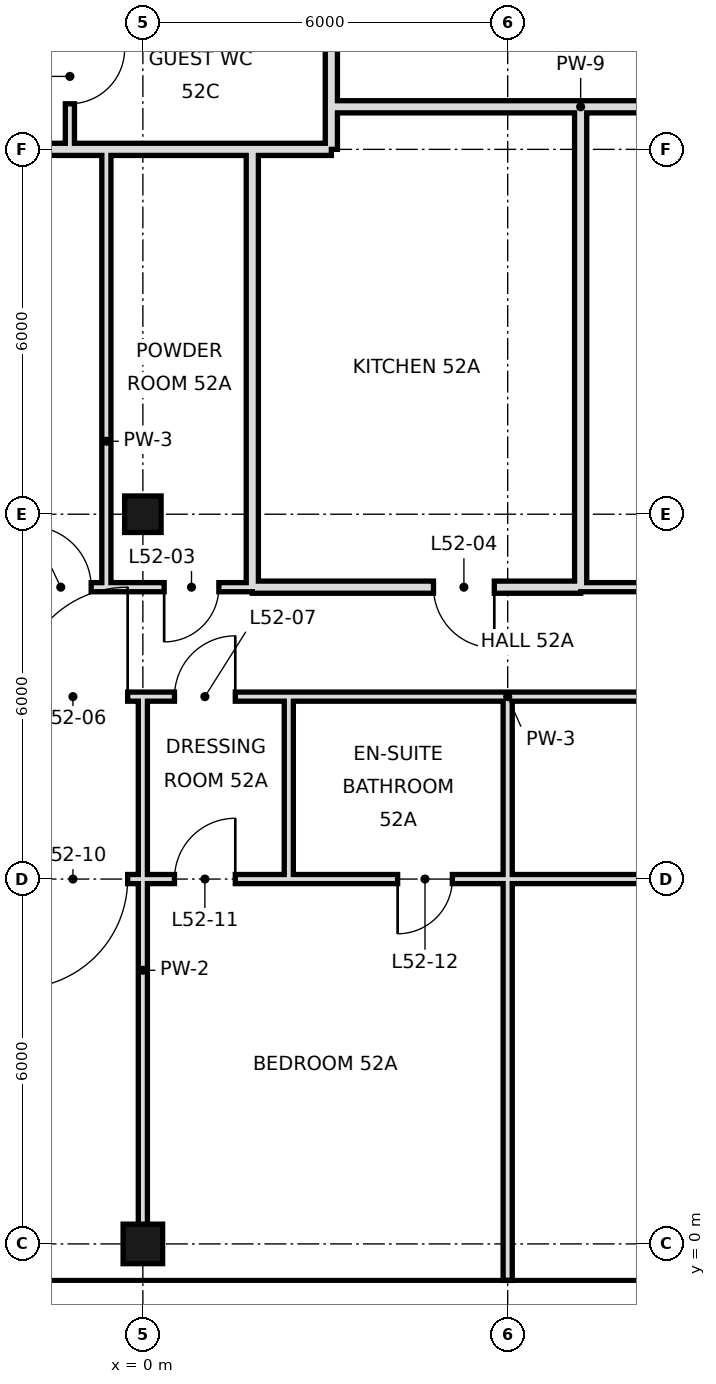
"""IFC4 building model, lengths in metres.
Left out: names, types, materials, properties, quantities, classifications, styles, units other than length and angle.
Written with IfcOpenShell. Run it as: python <this file> out.ifc"""

import sys

from ifc_helpers import new_model, si_unit, direction, frame, frame_2d, origin, origin_with_axes, origin_2d, place, context, subcontext, project, spatial, rectangle, hollow_rectangle, extrude, element, fill, save


model = new_model("IFC4")
c1 = context("Model", 3, precision=1e-05, world=origin(), true_north=direction((0.0, 1.0)))
c2 = subcontext(c1, "Body", "Model", "MODEL_VIEW")
j1 = project(units=[si_unit("LENGTHUNIT", "METRE"), si_unit("PLANEANGLEUNIT", "RADIAN")], contexts=[c1])
p1 = place(None, origin())
s1 = spatial("IfcSite", under=j1, at=p1, CompositionType="ELEMENT")
p2 = place(p1, origin())
s2 = spatial("IfcBuilding", under=s1, at=p2, CompositionType="ELEMENT")
p3 = place(p2, frame((0.0, 0.0, 222.6)))
s3 = spatial("IfcBuildingStorey", under=s2, at=p3, CompositionType="ELEMENT", Elevation=222.6)
p4 = place(p3, origin_with_axes())
e1 = element("IfcColumn", 1, at=p4, inside=s3, PredefinedType="COLUMN", context=c2, shape_type="SweptSolid", body=[
    extrude(hollow_rectangle(XDim=0.65, YDim=0.65, WallThickness=0.032, at=origin_2d()), origin(), (0.0, 0.0, 1.0), 3.6),
])
p5 = place(p3, frame((0.0, 12.0, 0.0), z_axis=(0.0, 0.0, 1.0), x_axis=(1.0, 0.0, 0.0)))
e2 = element("IfcColumn", 2, at=p5, inside=s3, PredefinedType="COLUMN", context=c2, shape_type="SweptSolid", body=[
    extrude(hollow_rectangle(XDim=0.6, YDim=0.6, WallThickness=0.028, at=origin_2d()), origin(), (0.0, 0.0, 1.0), 3.6),
])
p6 = place(p3, frame((-0.6, 10.8, 0.0), z_axis=(0.0, 0.0, 1.0), x_axis=(0.0, 1.0, 0.0)))
e3 = element("IfcWall", 3, at=p6, inside=s3, PredefinedType="PARTITIONING", context=c2, shape_type="SweptSolid", body=[
    extrude(rectangle(XDim=7.2, YDim=0.15, at=frame_2d((3.6, 0.0))), origin(), (0.0, 0.0, 1.0), 3.42),
])
p7 = place(p3, frame((-1.2, 18.0, 0.0), z_axis=(0.0, 0.0, 1.0), x_axis=(0.0, 1.0, 0.0)))
e4 = element("IfcWall", 4, at=p7, inside=s3, PredefinedType="PARTITIONING", context=c2, shape_type="SweptSolid", body=[
    extrude(rectangle(XDim=2.4, YDim=0.15, at=frame_2d((1.2, 0.0))), origin(), (0.0, 0.0, 1.0), 3.42),
])
p8 = place(p7, frame((0.75, 0.0, 0.0)))
e5 = element("IfcOpeningElement", 5, at=p8, cuts=e4, PredefinedType="OPENING", context=c2, shape_type="SweptSolid", body=[
    extrude(rectangle(XDim=0.9, YDim=2.4, at=frame_2d((0.45, 1.2))), frame((0.0, 0.085, 0.0), z_axis=(0.0, -1.0, 0.0), x_axis=(1.0, 0.0, 0.0)), (0.0, 0.0, 1.0), 0.17),
])
p9 = place(p3, frame((0.0, 0.0, 0.0), z_axis=(0.0, 0.0, 1.0), x_axis=(0.0, 1.0, 0.0)))
e6 = element("IfcWall", 6, at=p9, inside=s3, PredefinedType="PARTITIONING", context=c2, shape_type="SweptSolid", body=[
    extrude(rectangle(XDim=9.0, YDim=0.15, at=frame_2d((4.5, 0.0))), origin(), (0.0, 0.0, 1.0), 2.72),
])
p10 = place(p3, frame((1.8, 10.8, 0.0), z_axis=(0.0, 0.0, 1.0), x_axis=(0.0, 1.0, 0.0)))
e7 = element("IfcWall", 7, at=p10, inside=s3, PredefinedType="SOLIDWALL", context=c2, shape_type="SweptSolid", body=[
    extrude(rectangle(XDim=7.2, YDim=0.2, at=frame_2d((3.6, 0.0))), origin(), (0.0, 0.0, 1.0), 3.42),
])
p11 = place(p3, frame((2.4, 6.0, 0.0), z_axis=(0.0, 0.0, 1.0), x_axis=(0.0, 1.0, 0.0)))
e8 = element("IfcWall", 8, at=p11, inside=s3, PredefinedType="PARTITIONING", context=c2, shape_type="SweptSolid", body=[
    extrude(rectangle(XDim=3.0, YDim=0.15, at=frame_2d((1.5, 0.0))), origin(), (0.0, 0.0, 1.0), 3.42),
])
p12 = place(p3, frame((3.1, 18.7, 0.0), z_axis=(0.0, 0.0, 1.0), x_axis=(0.0, 1.0, 0.0)))
e9 = element("IfcWall", 9, at=p12, inside=s3, PredefinedType="SOLIDWALL", context=c2, shape_type="SweptSolid", body=[
    extrude(rectangle(XDim=15.5, YDim=0.2, at=frame_2d((7.75, 0.0))), origin(), (0.0, 0.0, 1.0), 2.97),
])
p13 = place(p12, frame((4.96, 0.0, 0.0)))
e10 = element("IfcOpeningElement", 10, at=p13, cuts=e9, PredefinedType="OPENING", context=c2, shape_type="SweptSolid", body=[
    extrude(rectangle(XDim=1.2, YDim=2.4, at=frame_2d((0.6, 1.2))), frame((0.0, 0.11, 0.0), z_axis=(0.0, -1.0, 0.0), x_axis=(1.0, 0.0, 0.0)), (0.0, 0.0, 1.0), 0.22),
])
p14 = place(p3, frame((3.1, 18.0, 0.0), z_axis=(0.0, 0.0, 1.0), x_axis=(0.0, 1.0, 0.0)))
e11 = element("IfcWall", 11, at=p14, inside=s3, PredefinedType="SOLIDWALL", context=c2, shape_type="SweptSolid", body=[
    extrude(rectangle(XDim=0.7, YDim=0.2, at=frame_2d((0.35, 0.0))), origin(), (0.0, 0.0, 1.0), 2.97),
])
p15 = place(p3, frame((6.0, -0.6, 0.0), z_axis=(0.0, 0.0, 1.0), x_axis=(0.0, 1.0, 0.0)))
e12 = element("IfcWall", 12, at=p15, inside=s3, PredefinedType="PARTITIONING", context=c2, shape_type="SweptSolid", body=[
    extrude(rectangle(XDim=6.6, YDim=0.15, at=frame_2d((3.3, 0.0))), origin(), (0.0, 0.0, 1.0), 2.72),
])
p16 = place(p3, frame((6.0, 6.0, 0.0), z_axis=(0.0, 0.0, 1.0), x_axis=(0.0, 1.0, 0.0)))
e13 = element("IfcWall", 13, at=p16, inside=s3, PredefinedType="PARTITIONING", context=c2, shape_type="SweptSolid", body=[
    extrude(rectangle(XDim=3.0, YDim=0.15, at=frame_2d((1.5, 0.0))), origin(), (0.0, 0.0, 1.0), 2.72),
])
p17 = place(p3, frame((7.2, 10.8, 0.0), z_axis=(0.0, 0.0, 1.0), x_axis=(0.0, 1.0, 0.0)))
e14 = element("IfcWall", 14, at=p17, inside=s3, PredefinedType="SOLIDWALL", context=c2, shape_type="SweptSolid", body=[
    extrude(rectangle(XDim=7.9, YDim=0.2, at=frame_2d((3.95, 0.0))), origin(), (0.0, 0.0, 1.0), 2.72),
])
p18 = place(p3, frame((1.8, 10.8, 0.0), z_axis=(0.0, 0.0, 1.0), x_axis=(1.0, 0.0, 0.0)))
e15 = element("IfcWall", 15, at=p18, inside=s3, PredefinedType="SOLIDWALL", context=c2, shape_type="SweptSolid", body=[
    extrude(rectangle(XDim=5.4, YDim=0.2, at=frame_2d((2.7, 0.0))), origin(), (0.0, 0.0, 1.0), 2.72),
])
p19 = place(p18, frame((2.98, 0.0, 0.0)))
e16 = element("IfcOpeningElement", 16, at=p19, cuts=e15, PredefinedType="OPENING", context=c2, shape_type="SweptSolid", body=[
    extrude(rectangle(XDim=1.0, YDim=2.4, at=frame_2d((0.5, 1.2))), frame((0.0, 0.11, 0.0), z_axis=(0.0, -1.0, 0.0), x_axis=(1.0, 0.0, 0.0)), (0.0, 0.0, 1.0), 0.22),
])
p20 = place(p3, frame((-12.6, 10.8, 0.0), z_axis=(0.0, 0.0, 1.0), x_axis=(1.0, 0.0, 0.0)))
e17 = element("IfcWall", 17, at=p20, inside=s3, PredefinedType="PARTITIONING", context=c2, shape_type="SweptSolid", body=[
    extrude(rectangle(XDim=12.0, YDim=0.15, at=frame_2d((6.0, 0.0))), origin(), (0.0, 0.0, 1.0), 3.42),
])
p21 = place(p20, frame((10.75, 0.0, 0.0)))
e18 = element("IfcOpeningElement", 18, at=p21, cuts=e17, PredefinedType="OPENING", context=c2, shape_type="SweptSolid", body=[
    extrude(rectangle(XDim=1.0, YDim=2.4, at=frame_2d((0.5, 1.2))), frame((0.0, 0.085, 0.0), z_axis=(0.0, -1.0, 0.0), x_axis=(1.0, 0.0, 0.0)), (0.0, 0.0, 1.0), 0.17),
])
p22 = place(p3, frame((7.2, 10.8, 0.0), z_axis=(0.0, 0.0, 1.0), x_axis=(1.0, 0.0, 0.0)))
e19 = element("IfcWall", 19, at=p22, inside=s3, PredefinedType="PARTITIONING", context=c2, shape_type="SweptSolid", body=[
    extrude(rectangle(XDim=24.6, YDim=0.15, at=frame_2d((12.3, 0.0))), origin(), (0.0, 0.0, 1.0), 3.42),
])
p23 = place(p22, frame((1.6, 0.0, 0.0)))
e20 = element("IfcOpeningElement", 20, at=p23, cuts=e19, PredefinedType="OPENING", context=c2, shape_type="SweptSolid", body=[
    extrude(rectangle(XDim=1.0, YDim=2.4, at=frame_2d((0.5, 1.2))), frame((0.0, 0.085, 0.0), z_axis=(0.0, -1.0, 0.0), x_axis=(1.0, 0.0, 0.0)), (0.0, 0.0, 1.0), 0.17),
])
p24 = place(p22, frame((9.04, 0.0, 0.0)))
e21 = element("IfcOpeningElement", 21, at=p24, cuts=e19, PredefinedType="OPENING", context=c2, shape_type="SweptSolid", body=[
    extrude(rectangle(XDim=1.0, YDim=2.4, at=frame_2d((0.5, 1.2))), frame((0.0, 0.085, 0.0), z_axis=(0.0, -1.0, 0.0), x_axis=(1.0, 0.0, 0.0)), (0.0, 0.0, 1.0), 0.17),
])
p25 = place(p22, frame((21.46, 0.0, 0.0)))
e22 = element("IfcOpeningElement", 22, at=p25, cuts=e19, PredefinedType="OPENING", context=c2, shape_type="SweptSolid", body=[
    extrude(rectangle(XDim=1.0, YDim=2.4, at=frame_2d((0.5, 1.2))), frame((0.0, 0.085, 0.0), z_axis=(0.0, -1.0, 0.0), x_axis=(1.0, 0.0, 0.0)), (0.0, 0.0, 1.0), 0.17),
])
p26 = place(p3, frame((-0.6, 10.8, 0.0), z_axis=(0.0, 0.0, 1.0), x_axis=(1.0, 0.0, 0.0)))
e23 = element("IfcWall", 23, at=p26, inside=s3, PredefinedType="PARTITIONING", context=c2, shape_type="SweptSolid", body=[
    extrude(rectangle(XDim=2.4, YDim=0.15, at=frame_2d((1.2, 0.0))), origin(), (0.0, 0.0, 1.0), 3.42),
])
p27 = place(p26, frame((0.95, 0.0, 0.0)))
e24 = element("IfcOpeningElement", 24, at=p27, cuts=e23, PredefinedType="OPENING", context=c2, shape_type="SweptSolid", body=[
    extrude(rectangle(XDim=0.9, YDim=2.4, at=frame_2d((0.45, 1.2))), frame((0.0, 0.085, 0.0), z_axis=(0.0, -1.0, 0.0), x_axis=(1.0, 0.0, 0.0)), (0.0, 0.0, 1.0), 0.17),
])
p28 = place(p3, frame((1.8, 18.0, 0.0), z_axis=(0.0, 0.0, 1.0), x_axis=(1.0, 0.0, 0.0)))
e25 = element("IfcWall", 25, at=p28, inside=s3, PredefinedType="SOLIDWALL", context=c2, shape_type="SweptSolid", body=[
    extrude(rectangle(XDim=1.3, YDim=0.2, at=frame_2d((0.65, 0.0))), origin(), (0.0, 0.0, 1.0), 2.97),
])
p29 = place(p3, frame((-12.6, 18.0, 0.0), z_axis=(0.0, 0.0, 1.0), x_axis=(1.0, 0.0, 0.0)))
e26 = element("IfcWall", 26, at=p29, inside=s3, PredefinedType="SOLIDWALL", context=c2, shape_type="SweptSolid", body=[
    extrude(rectangle(XDim=14.4, YDim=0.2, at=frame_2d((7.2, 0.0))), origin(), (0.0, 0.0, 1.0), 2.72),
])
p30 = place(p3, frame((7.2, 18.7, 0.0), z_axis=(0.0, 0.0, 1.0), x_axis=(1.0, 0.0, 0.0)))
e27 = element("IfcWall", 27, at=p30, inside=s3, PredefinedType="SOLIDWALL", context=c2, shape_type="SweptSolid", body=[
    extrude(rectangle(XDim=37.7, YDim=0.2, at=frame_2d((18.85, 0.0))), origin(), (0.0, 0.0, 1.0), 2.72),
])
p31 = place(p30, frame((1.54, 0.0, 0.0)))
e28 = element("IfcOpeningElement", 28, at=p31, cuts=e27, PredefinedType="OPENING", context=c2, shape_type="SweptSolid", body=[
    extrude(rectangle(XDim=1.2, YDim=2.4, at=frame_2d((0.6, 1.2))), frame((0.0, 0.11, 0.0), z_axis=(0.0, -1.0, 0.0), x_axis=(1.0, 0.0, 0.0)), (0.0, 0.0, 1.0), 0.22),
])
p32 = place(p30, frame((30.26, 0.0, 0.0)))
e29 = element("IfcOpeningElement", 29, at=p32, cuts=e27, PredefinedType="OPENING", context=c2, shape_type="SweptSolid", body=[
    extrude(rectangle(XDim=1.2, YDim=2.4, at=frame_2d((0.6, 1.2))), frame((0.0, 0.11, 0.0), z_axis=(0.0, -1.0, 0.0), x_axis=(1.0, 0.0, 0.0)), (0.0, 0.0, 1.0), 0.22),
])
p33 = place(p3, frame((3.1, 18.7, 0.0), z_axis=(0.0, 0.0, 1.0), x_axis=(1.0, 0.0, 0.0)))
e30 = element("IfcWall", 30, at=p33, inside=s3, PredefinedType="SOLIDWALL", context=c2, shape_type="SweptSolid", body=[
    extrude(rectangle(XDim=4.1, YDim=0.2, at=frame_2d((2.05, 0.0))), origin(), (0.0, 0.0, 1.0), 2.72),
])
p34 = place(p3, frame((-12.0, 6.0, 0.0), z_axis=(0.0, 0.0, 1.0), x_axis=(1.0, 0.0, 0.0)))
e31 = element("IfcWall", 31, at=p34, inside=s3, PredefinedType="PARTITIONING", context=c2, shape_type="SweptSolid", body=[
    extrude(rectangle(XDim=14.4, YDim=0.15, at=frame_2d((7.2, 0.0))), origin(), (0.0, 0.0, 1.0), 2.72),
])
p35 = place(p34, frame((9.95, 0.0, 0.0)))
e32 = element("IfcOpeningElement", 32, at=p35, cuts=e31, PredefinedType="OPENING", context=c2, shape_type="SweptSolid", body=[
    extrude(rectangle(XDim=1.8, YDim=2.4, at=frame_2d((0.9, 1.2))), frame((0.0, 0.085, 0.0), z_axis=(0.0, -1.0, 0.0), x_axis=(1.0, 0.0, 0.0)), (0.0, 0.0, 1.0), 0.17),
])
p36 = place(p34, frame((12.52, 0.0, 0.0)))
e33 = element("IfcOpeningElement", 33, at=p36, cuts=e31, PredefinedType="OPENING", context=c2, shape_type="SweptSolid", body=[
    extrude(rectangle(XDim=1.0, YDim=2.4, at=frame_2d((0.5, 1.2))), frame((0.0, 0.085, 0.0), z_axis=(0.0, -1.0, 0.0), x_axis=(1.0, 0.0, 0.0)), (0.0, 0.0, 1.0), 0.17),
])
p37 = place(p3, frame((6.0, 6.0, 0.0), z_axis=(0.0, 0.0, 1.0), x_axis=(1.0, 0.0, 0.0)))
e34 = element("IfcWall", 34, at=p37, inside=s3, PredefinedType="PARTITIONING", context=c2, shape_type="SweptSolid", body=[
    extrude(rectangle(XDim=12.0, YDim=0.15, at=frame_2d((6.0, 0.0))), origin(), (0.0, 0.0, 1.0), 2.97),
])
p38 = place(p37, frame((3.4, 0.0, 0.0)))
e35 = element("IfcOpeningElement", 35, at=p38, cuts=e34, PredefinedType="OPENING", context=c2, shape_type="SweptSolid", body=[
    extrude(rectangle(XDim=1.0, YDim=2.4, at=frame_2d((0.5, 1.2))), frame((0.0, 0.085, 0.0), z_axis=(0.0, -1.0, 0.0), x_axis=(1.0, 0.0, 0.0)), (0.0, 0.0, 1.0), 0.17),
])
p39 = place(p3, frame((2.4, 6.0, 0.0), z_axis=(0.0, 0.0, 1.0), x_axis=(1.0, 0.0, 0.0)))
e36 = element("IfcWall", 36, at=p39, inside=s3, PredefinedType="PARTITIONING", context=c2, shape_type="SweptSolid", body=[
    extrude(rectangle(XDim=3.6, YDim=0.15, at=frame_2d((1.8, 0.0))), origin(), (0.0, 0.0, 1.0), 2.97),
])
p40 = place(p39, frame((1.79, 0.0, 0.0)))
e37 = element("IfcOpeningElement", 37, at=p40, cuts=e36, PredefinedType="OPENING", context=c2, shape_type="SweptSolid", body=[
    extrude(rectangle(XDim=0.9, YDim=2.4, at=frame_2d((0.45, 1.2))), frame((0.0, 0.085, 0.0), z_axis=(0.0, -1.0, 0.0), x_axis=(1.0, 0.0, 0.0)), (0.0, 0.0, 1.0), 0.17),
])
p41 = place(p3, frame((-12.6, 9.0, 0.0), z_axis=(0.0, 0.0, 1.0), x_axis=(1.0, 0.0, 0.0)))
e38 = element("IfcWall", 38, at=p41, inside=s3, PredefinedType="PARTITIONING", context=c2, shape_type="SweptSolid", body=[
    extrude(rectangle(XDim=15.0, YDim=0.15, at=frame_2d((7.5, 0.0))), origin(), (0.0, 0.0, 1.0), 3.42),
])
p42 = place(p41, frame((10.55, 0.0, 0.0)))
e39 = element("IfcOpeningElement", 39, at=p42, cuts=e38, PredefinedType="OPENING", context=c2, shape_type="SweptSolid", body=[
    extrude(rectangle(XDim=1.8, YDim=2.4, at=frame_2d((0.9, 1.2))), frame((0.0, 0.085, 0.0), z_axis=(0.0, -1.0, 0.0), x_axis=(1.0, 0.0, 0.0)), (0.0, 0.0, 1.0), 0.17),
])
p43 = place(p41, frame((13.12, 0.0, 0.0)))
e40 = element("IfcOpeningElement", 40, at=p43, cuts=e38, PredefinedType="OPENING", context=c2, shape_type="SweptSolid", body=[
    extrude(rectangle(XDim=1.0, YDim=2.4, at=frame_2d((0.5, 1.2))), frame((0.0, 0.085, 0.0), z_axis=(0.0, -1.0, 0.0), x_axis=(1.0, 0.0, 0.0)), (0.0, 0.0, 1.0), 0.17),
])
p44 = place(p3, frame((6.0, 9.0, 0.0), z_axis=(0.0, 0.0, 1.0), x_axis=(1.0, 0.0, 0.0)))
e41 = element("IfcWall", 41, at=p44, inside=s3, PredefinedType="PARTITIONING", context=c2, shape_type="SweptSolid", body=[
    extrude(rectangle(XDim=18.0, YDim=0.15, at=frame_2d((9.0, 0.0))), origin(), (0.0, 0.0, 1.0), 3.42),
])
p45 = place(p44, frame((5.5, 0.0, 0.0)))
e42 = element("IfcOpeningElement", 42, at=p45, cuts=e41, PredefinedType="OPENING", context=c2, shape_type="SweptSolid", body=[
    extrude(rectangle(XDim=1.0, YDim=2.4, at=frame_2d((0.5, 1.2))), frame((0.0, 0.085, 0.0), z_axis=(0.0, -1.0, 0.0), x_axis=(1.0, 0.0, 0.0)), (0.0, 0.0, 1.0), 0.17),
])
p46 = place(p44, frame((13.6, 0.0, 0.0)))
e43 = element("IfcOpeningElement", 43, at=p46, cuts=e41, PredefinedType="OPENING", context=c2, shape_type="SweptSolid", body=[
    extrude(rectangle(XDim=1.0, YDim=2.4, at=frame_2d((0.5, 1.2))), frame((0.0, 0.085, 0.0), z_axis=(0.0, -1.0, 0.0), x_axis=(1.0, 0.0, 0.0)), (0.0, 0.0, 1.0), 0.17),
])
p47 = place(p3, frame((2.4, 9.0, 0.0), z_axis=(0.0, 0.0, 1.0), x_axis=(1.0, 0.0, 0.0)))
e44 = element("IfcWall", 44, at=p47, inside=s3, PredefinedType="PARTITIONING", context=c2, shape_type="SweptSolid", body=[
    extrude(rectangle(XDim=3.6, YDim=0.15, at=frame_2d((1.8, 0.0))), origin(), (0.0, 0.0, 1.0), 3.42),
])
p48 = place(p21, origin())
e45 = element("IfcDoor", 45, at=p48, inside=s3, OperationType="SINGLE_SWING_LEFT", PredefinedType="DOOR", context=c2, shape_type="SweptSolid", body=[
    extrude(rectangle(XDim=1.0, YDim=2.4, at=frame_2d((0.5, 1.2))), frame((0.0, 0.025, 0.0), z_axis=(0.0, -1.0, 0.0), x_axis=(1.0, 0.0, 0.0)), (0.0, 0.0, 1.0), 0.05),
])
fill(e18, e45)
p49 = place(p27, frame((0.9, 0.0, 0.0), z_axis=(0.0, 0.0, 1.0), x_axis=(-1.0, 0.0, 0.0)))
e46 = element("IfcDoor", 46, at=p49, inside=s3, OperationType="SINGLE_SWING_RIGHT", PredefinedType="DOOR", context=c2, shape_type="SweptSolid", body=[
    extrude(rectangle(XDim=0.9, YDim=2.4, at=frame_2d((0.45, 1.2))), frame((0.0, 0.025, 0.0), z_axis=(0.0, -1.0, 0.0), x_axis=(1.0, 0.0, 0.0)), (0.0, 0.0, 1.0), 0.05),
])
fill(e24, e46)
p50 = place(p19, origin())
e47 = element("IfcDoor", 47, at=p50, inside=s3, OperationType="SINGLE_SWING_RIGHT", PredefinedType="DOOR", context=c2, shape_type="SweptSolid", body=[
    extrude(rectangle(XDim=1.0, YDim=2.4, at=frame_2d((0.5, 1.2))), frame((0.0, 0.025, 0.0), z_axis=(0.0, -1.0, 0.0), x_axis=(1.0, 0.0, 0.0)), (0.0, 0.0, 1.0), 0.05),
])
fill(e16, e47)
p51 = place(p42, frame((1.8, 0.0, 0.0), z_axis=(0.0, 0.0, 1.0), x_axis=(-1.0, 0.0, 0.0)))
e48 = element("IfcDoor", 48, at=p51, inside=s3, OperationType="SINGLE_SWING_LEFT", PredefinedType="DOOR", context=c2, shape_type="SweptSolid", body=[
    extrude(rectangle(XDim=1.8, YDim=2.4, at=frame_2d((0.9, 1.2))), frame((0.0, 0.025, 0.0), z_axis=(0.0, -1.0, 0.0), x_axis=(1.0, 0.0, 0.0)), (0.0, 0.0, 1.0), 0.05),
])
fill(e39, e48)
p52 = place(p43, frame((1.0, 0.0, 0.0), z_axis=(0.0, 0.0, 1.0), x_axis=(-1.0, 0.0, 0.0)))
e49 = element("IfcDoor", 49, at=p52, inside=s3, OperationType="SINGLE_SWING_LEFT", PredefinedType="DOOR", context=c2, shape_type="SweptSolid", body=[
    extrude(rectangle(XDim=1.0, YDim=2.4, at=frame_2d((0.5, 1.2))), frame((0.0, 0.025, 0.0), z_axis=(0.0, -1.0, 0.0), x_axis=(1.0, 0.0, 0.0)), (0.0, 0.0, 1.0), 0.05),
])
fill(e40, e49)
p53 = place(p35, frame((1.8, 0.0, 0.0), z_axis=(0.0, 0.0, 1.0), x_axis=(-1.0, 0.0, 0.0)))
e50 = element("IfcDoor", 50, at=p53, inside=s3, OperationType="SINGLE_SWING_RIGHT", PredefinedType="DOOR", context=c2, shape_type="SweptSolid", body=[
    extrude(rectangle(XDim=1.8, YDim=2.4, at=frame_2d((0.9, 1.2))), frame((0.0, 0.025, 0.0), z_axis=(0.0, -1.0, 0.0), x_axis=(1.0, 0.0, 0.0)), (0.0, 0.0, 1.0), 0.05),
])
fill(e32, e50)
p54 = place(p36, frame((1.0, 0.0, 0.0), z_axis=(0.0, 0.0, 1.0), x_axis=(-1.0, 0.0, 0.0)))
e51 = element("IfcDoor", 51, at=p54, inside=s3, OperationType="SINGLE_SWING_LEFT", PredefinedType="DOOR", context=c2, shape_type="SweptSolid", body=[
    extrude(rectangle(XDim=1.0, YDim=2.4, at=frame_2d((0.5, 1.2))), frame((0.0, 0.025, 0.0), z_axis=(0.0, -1.0, 0.0), x_axis=(1.0, 0.0, 0.0)), (0.0, 0.0, 1.0), 0.05),
])
fill(e33, e51)
p55 = place(p40, frame((0.9, 0.0, 0.0), z_axis=(0.0, 0.0, 1.0), x_axis=(-1.0, 0.0, 0.0)))
e52 = element("IfcDoor", 52, at=p55, inside=s3, OperationType="SINGLE_SWING_RIGHT", PredefinedType="DOOR", context=c2, shape_type="SweptSolid", body=[
    extrude(rectangle(XDim=0.9, YDim=2.4, at=frame_2d((0.45, 1.2))), frame((0.0, 0.025, 0.0), z_axis=(0.0, -1.0, 0.0), x_axis=(1.0, 0.0, 0.0)), (0.0, 0.0, 1.0), 0.05),
])
fill(e37, e52)
p56 = place(p8, origin())
e53 = element("IfcDoor", 53, at=p56, inside=s3, OperationType="SINGLE_SWING_RIGHT", PredefinedType="DOOR", context=c2, shape_type="SweptSolid", body=[
    extrude(rectangle(XDim=0.9, YDim=2.4, at=frame_2d((0.45, 1.2))), frame((0.0, 0.025, 0.0), z_axis=(0.0, -1.0, 0.0), x_axis=(1.0, 0.0, 0.0)), (0.0, 0.0, 1.0), 0.05),
])
fill(e5, e53)
save(model, sys.argv[1])
